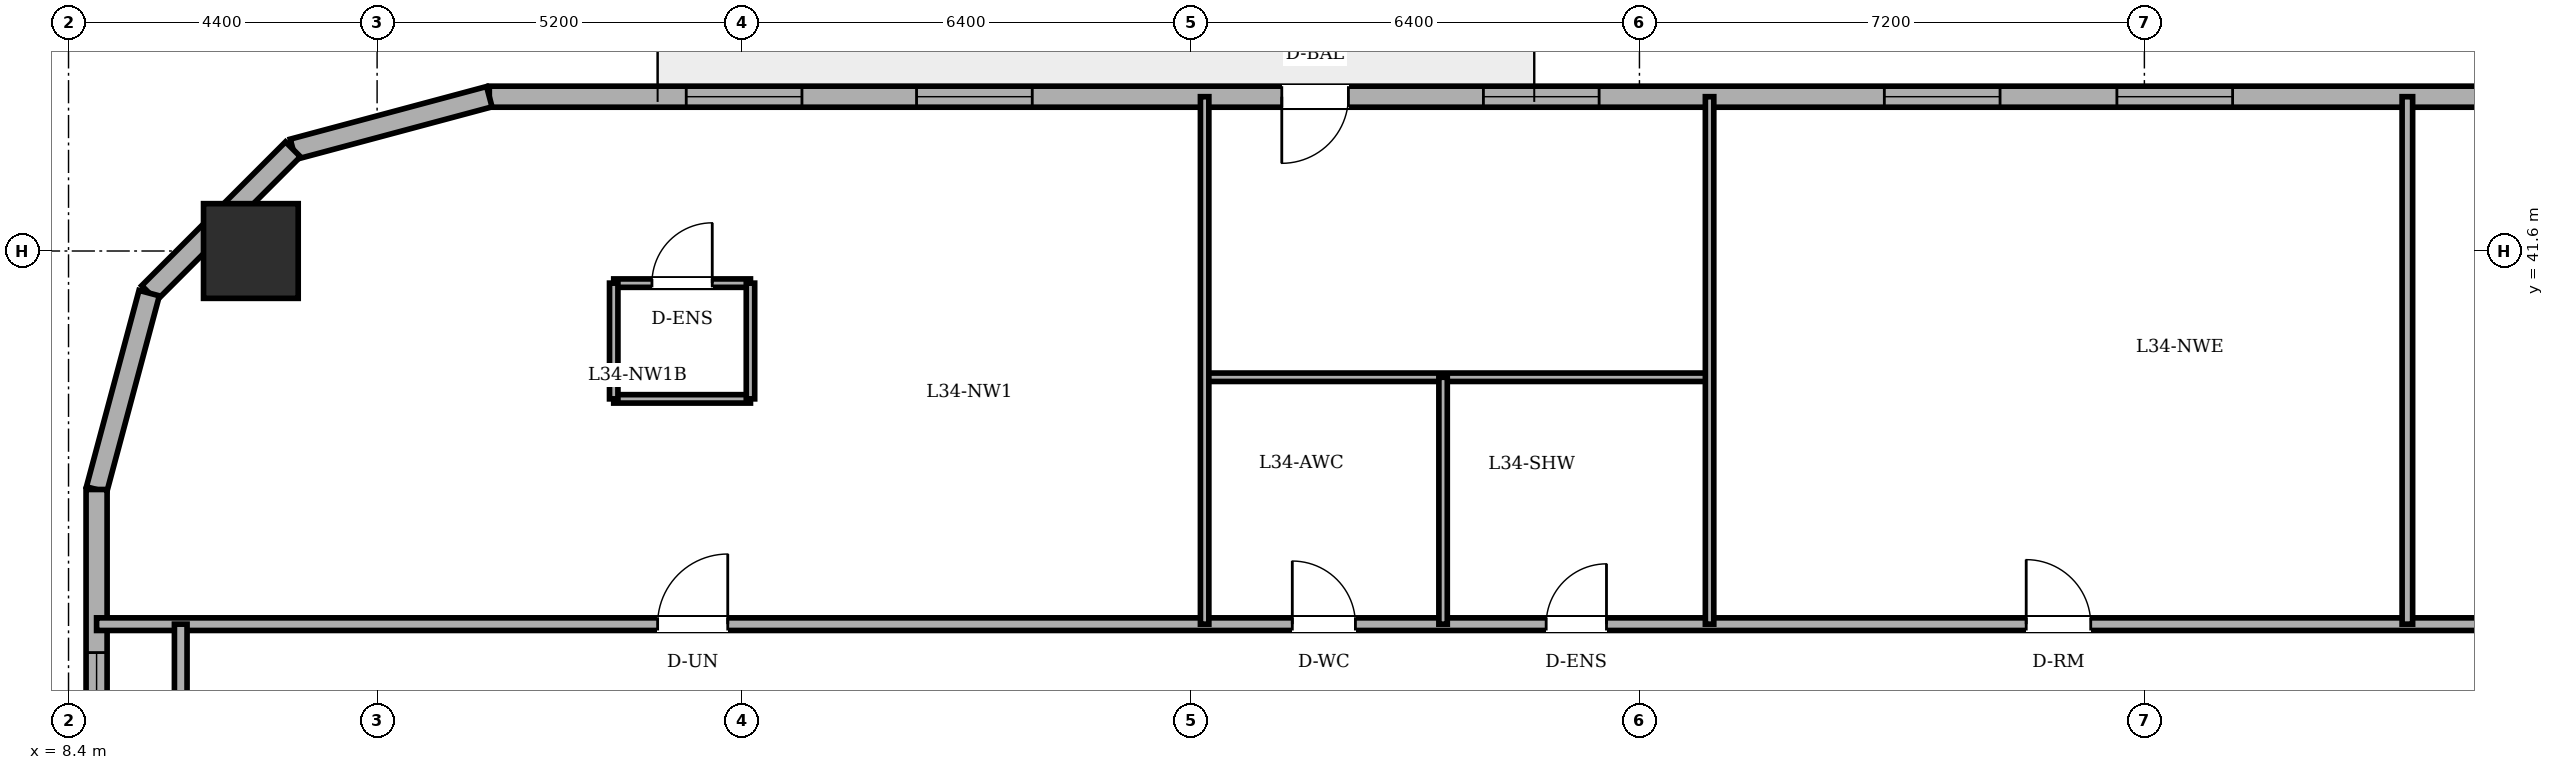
"""IFC4 building model, lengths in metres.
Left out: names, types, materials, properties, quantities, classifications, styles, units other than length and angle.
Written with IfcOpenShell. Run it as: python <this file> out.ifc"""

import sys

from ifc_helpers import new_model, si_unit, direction, frame, frame_2d, origin, origin_2d, place, context, subcontext, project, spatial, rectangle, circle, extrude, element, fill, save


model = new_model("IFC4")
c1 = context("Model", 3, precision=1e-05, world=origin(), true_north=direction((0.0, 1.0)))
c2 = subcontext(c1, "Body", "Model", "MODEL_VIEW")
j1 = project(units=[si_unit("LENGTHUNIT", "METRE"), si_unit("PLANEANGLEUNIT", "RADIAN")], contexts=[c1])
p1 = place(None, origin())
s1 = spatial("IfcSite", under=j1, at=p1, CompositionType="ELEMENT")
p2 = place(p1, origin())
s2 = spatial("IfcBuilding", under=s1, at=p2, CompositionType="ELEMENT")
p3 = place(p2, frame((0.0, 0.0, 129.5)))
s3 = spatial("IfcBuildingStorey", under=s2, at=p3, CompositionType="ELEMENT", Elevation=129.5)
p4 = place(p3, frame((11.0, 41.6, 0.0), z_axis=(0.0, 0.0, 1.0), x_axis=(1.0, 0.0, 0.0)))
e1 = element("IfcColumn", 1, at=p4, inside=s3, PredefinedType="COLUMN", context=c2, shape_type="SweptSolid", body=[
    extrude(circle(Radius=0.675, at=origin_2d()), origin(), (0.0, 0.0, 1.0), 3.6),
])
p5 = place(p3, frame((44.333, 43.8, 0.0), z_axis=(0.0, 0.0, 1.0), x_axis=(-1.0, 0.0, 0.0)))
e2 = element("IfcWall", 2, at=p5, inside=s3, PredefinedType="SOLIDWALL", context=c2, shape_type="SweptSolid", body=[
    extrude(rectangle(XDim=29.933, YDim=0.3, at=frame_2d((14.967, 0.0))), origin(), (0.0, 0.0, 1.0), 3.36),
])
p6 = place(p5, frame((17.683, 0.0, 0.0)))
e3 = element("IfcOpeningElement", 3, at=p6, cuts=e2, PredefinedType="OPENING", context=c2, shape_type="SweptSolid", body=[
    extrude(rectangle(XDim=0.95, YDim=2.2, at=frame_2d((0.475, 1.1))), frame((0.0, 0.16, 0.0), z_axis=(0.0, -1.0, 0.0), x_axis=(1.0, 0.0, 0.0)), (0.0, 0.0, 1.0), 0.32),
])
p7 = place(p5, frame((5.075, 0.0, 0.85)))
e4 = element("IfcOpeningElement", 4, at=p7, cuts=e2, PredefinedType="OPENING", context=c2, shape_type="SweptSolid", body=[
    extrude(rectangle(XDim=1.65, YDim=1.55, at=frame_2d((0.825, 0.775))), frame((0.0, 0.16, 0.0), z_axis=(0.0, -1.0, 0.0), x_axis=(1.0, 0.0, 0.0)), (0.0, 0.0, 1.0), 0.32),
])
p8 = place(p5, frame((8.391, 0.0, 0.85)))
e5 = element("IfcOpeningElement", 5, at=p8, cuts=e2, PredefinedType="OPENING", context=c2, shape_type="SweptSolid", body=[
    extrude(rectangle(XDim=1.65, YDim=1.55, at=frame_2d((0.825, 0.775))), frame((0.0, 0.16, 0.0), z_axis=(0.0, -1.0, 0.0), x_axis=(1.0, 0.0, 0.0)), (0.0, 0.0, 1.0), 0.32),
])
p9 = place(p5, frame((14.108, 0.0, 0.85)))
e6 = element("IfcOpeningElement", 6, at=p9, cuts=e2, PredefinedType="OPENING", context=c2, shape_type="SweptSolid", body=[
    extrude(rectangle(XDim=1.65, YDim=1.55, at=frame_2d((0.825, 0.775))), frame((0.0, 0.16, 0.0), z_axis=(0.0, -1.0, 0.0), x_axis=(1.0, 0.0, 0.0)), (0.0, 0.0, 1.0), 0.32),
])
p10 = place(p5, frame((22.191, 0.0, 0.85)))
e7 = element("IfcOpeningElement", 7, at=p10, cuts=e2, PredefinedType="OPENING", context=c2, shape_type="SweptSolid", body=[
    extrude(rectangle(XDim=1.65, YDim=1.55, at=frame_2d((0.825, 0.775))), frame((0.0, 0.16, 0.0), z_axis=(0.0, -1.0, 0.0), x_axis=(1.0, 0.0, 0.0)), (0.0, 0.0, 1.0), 0.32),
])
p11 = place(p5, frame((25.475, 0.0, 0.85)))
e8 = element("IfcOpeningElement", 8, at=p11, cuts=e2, PredefinedType="OPENING", context=c2, shape_type="SweptSolid", body=[
    extrude(rectangle(XDim=1.65, YDim=1.55, at=frame_2d((0.825, 0.775))), frame((0.0, 0.16, 0.0), z_axis=(0.0, -1.0, 0.0), x_axis=(1.0, 0.0, 0.0)), (0.0, 0.0, 1.0), 0.32),
])
p12 = place(p3, frame((14.4, 43.8, 0.0), z_axis=(0.0, 0.0, 1.0), x_axis=(-0.965943540406, -0.258752926066, 0.0)))
e9 = element("IfcWall", 9, at=p12, inside=s3, PredefinedType="SOLIDWALL", context=c2, shape_type="SweptSolid", body=[
    extrude(rectangle(XDim=2.898, YDim=0.3, at=frame_2d((1.449, 0.0))), origin(), (0.0, 0.0, 1.0), 3.36),
])
p13 = place(p3, frame((11.6, 43.05, 0.0), z_axis=(0.0, 0.0, 1.0), x_axis=(-0.707106781187, -0.707106781187, 0.0)))
e10 = element("IfcWall", 10, at=p13, inside=s3, PredefinedType="SOLIDWALL", context=c2, shape_type="SweptSolid", body=[
    extrude(rectangle(XDim=2.899, YDim=0.3, at=frame_2d((1.45, 0.0))), origin(), (0.0, 0.0, 1.0), 3.36),
])
p14 = place(p3, frame((9.55, 41.0, 0.0), z_axis=(0.0, 0.0, 1.0), x_axis=(-0.258731875344, -0.96594917914, 0.0)))
e11 = element("IfcWall", 11, at=p14, inside=s3, PredefinedType="SOLIDWALL", context=c2, shape_type="SweptSolid", body=[
    extrude(rectangle(XDim=2.899, YDim=0.3, at=frame_2d((1.449, 0.0))), origin(), (0.0, 0.0, 1.0), 3.36),
])
p15 = place(p3, frame((8.8, 38.2, 0.0), z_axis=(0.0, 0.0, 1.0), x_axis=(0.0, -1.0, 0.0)))
e12 = element("IfcWall", 12, at=p15, inside=s3, PredefinedType="SOLIDWALL", context=c2, shape_type="SweptSolid", body=[
    extrude(rectangle(XDim=28.4, YDim=0.3, at=frame_2d((14.2, 0.0))), origin(), (0.0, 0.0, 1.0), 3.36),
])
p16 = place(p15, frame((2.325, 0.0, 0.85)))
e13 = element("IfcOpeningElement", 13, at=p16, cuts=e12, PredefinedType="OPENING", context=c2, shape_type="SweptSolid", body=[
    extrude(rectangle(XDim=1.65, YDim=1.55, at=frame_2d((0.825, 0.775))), frame((0.0, 0.16, 0.0), z_axis=(0.0, -1.0, 0.0), x_axis=(1.0, 0.0, 0.0)), (0.0, 0.0, 1.0), 0.32),
])
p17 = place(p15, frame((6.828, 0.0, 0.85)))
e14 = element("IfcOpeningElement", 14, at=p17, cuts=e12, PredefinedType="OPENING", context=c2, shape_type="SweptSolid", body=[
    extrude(rectangle(XDim=1.65, YDim=1.55, at=frame_2d((0.825, 0.775))), frame((0.0, 0.16, 0.0), z_axis=(0.0, -1.0, 0.0), x_axis=(1.0, 0.0, 0.0)), (0.0, 0.0, 1.0), 0.32),
])
p18 = place(p15, frame((10.102, 0.0, 0.85)))
e15 = element("IfcOpeningElement", 15, at=p18, cuts=e12, PredefinedType="OPENING", context=c2, shape_type="SweptSolid", body=[
    extrude(rectangle(XDim=1.65, YDim=1.55, at=frame_2d((0.825, 0.775))), frame((0.0, 0.16, 0.0), z_axis=(0.0, -1.0, 0.0), x_axis=(1.0, 0.0, 0.0)), (0.0, 0.0, 1.0), 0.32),
])
p19 = place(p15, frame((16.648, 0.0, 0.85)))
e16 = element("IfcOpeningElement", 16, at=p19, cuts=e12, PredefinedType="OPENING", context=c2, shape_type="SweptSolid", body=[
    extrude(rectangle(XDim=1.65, YDim=1.55, at=frame_2d((0.825, 0.775))), frame((0.0, 0.16, 0.0), z_axis=(0.0, -1.0, 0.0), x_axis=(1.0, 0.0, 0.0)), (0.0, 0.0, 1.0), 0.32),
])
p20 = place(p15, frame((19.922, 0.0, 0.85)))
e17 = element("IfcOpeningElement", 17, at=p20, cuts=e12, PredefinedType="OPENING", context=c2, shape_type="SweptSolid", body=[
    extrude(rectangle(XDim=1.65, YDim=1.55, at=frame_2d((0.825, 0.775))), frame((0.0, 0.16, 0.0), z_axis=(0.0, -1.0, 0.0), x_axis=(1.0, 0.0, 0.0)), (0.0, 0.0, 1.0), 0.32),
])
p21 = place(p15, frame((24.425, 0.0, 0.85)))
e18 = element("IfcOpeningElement", 18, at=p21, cuts=e12, PredefinedType="OPENING", context=c2, shape_type="SweptSolid", body=[
    extrude(rectangle(XDim=1.65, YDim=1.55, at=frame_2d((0.825, 0.775))), frame((0.0, 0.16, 0.0), z_axis=(0.0, -1.0, 0.0), x_axis=(1.0, 0.0, 0.0)), (0.0, 0.0, 1.0), 0.32),
])
p22 = place(p3, frame((16.174, 41.142, 0.0), z_axis=(0.0, 0.0, 1.0), x_axis=(1.0, 0.0, 0.0)))
e19 = element("IfcWall", 19, at=p22, inside=s3, PredefinedType="PARTITIONING", context=c2, shape_type="SweptSolid", body=[
    extrude(rectangle(XDim=1.95, YDim=0.12, at=frame_2d((0.975, 0.0))), origin(), (0.0, 0.0, 1.0), 3.36),
])
p23 = place(p22, frame((0.545, 0.0, 0.0)))
e20 = element("IfcOpeningElement", 20, at=p23, cuts=e19, PredefinedType="OPENING", context=c2, shape_type="SweptSolid", body=[
    extrude(rectangle(XDim=0.86, YDim=2.1, at=frame_2d((0.43, 1.05))), frame((0.0, 0.07, 0.0), z_axis=(0.0, -1.0, 0.0), x_axis=(1.0, 0.0, 0.0)), (0.0, 0.0, 1.0), 0.14),
])
p24 = place(p3, frame((18.124, 39.492, 0.0), z_axis=(0.0, 0.0, 1.0), x_axis=(-1.0, 0.0, 0.0)))
e21 = element("IfcWall", 21, at=p24, inside=s3, PredefinedType="PARTITIONING", context=c2, shape_type="SweptSolid", body=[
    extrude(rectangle(XDim=1.95, YDim=0.12, at=frame_2d((0.975, 0.0))), origin(), (0.0, 0.0, 1.0), 3.36),
])
for number, where, z_axis, x_axis in (
    (22, (16.174, 41.142, 0.0), (0.0, 0.0, 1.0), (0.0, -1.0, 0.0)),
    (23, (18.124, 39.492, 0.0), (0.0, 0.0, 1.0), (0.0, 1.0, 0.0)),
):
    element("IfcWall", number, at=place(p3, frame(where, z_axis=z_axis, x_axis=x_axis)), inside=s3, PredefinedType="PARTITIONING", context=c2, shape_type="SweptSolid", body=[
        extrude(rectangle(XDim=1.65, YDim=0.12, at=frame_2d((0.825, 0.0))), origin(), (0.0, 0.0, 1.0), 3.36),
    ])
p25 = place(p3, frame((8.8, 36.28, 0.0), z_axis=(0.0, 0.0, 1.0), x_axis=(1.0, 0.0, 0.0)))
e24 = element("IfcWall", 24, at=p25, inside=s3, PredefinedType="PARTITIONING", context=c2, shape_type="SweptSolid", body=[
    extrude(rectangle(XDim=47.141, YDim=0.18, at=frame_2d((23.57, 0.0))), origin(), (0.0, 0.0, 1.0), 3.36),
])
p26 = place(p25, frame((17.05, 0.0, 0.0)))
e25 = element("IfcOpeningElement", 25, at=p26, cuts=e24, PredefinedType="OPENING", context=c2, shape_type="SweptSolid", body=[
    extrude(rectangle(XDim=0.9, YDim=2.1, at=frame_2d((0.45, 1.05))), frame((0.0, 0.1, 0.0), z_axis=(0.0, -1.0, 0.0), x_axis=(1.0, 0.0, 0.0)), (0.0, 0.0, 1.0), 0.2),
])
p27 = place(p25, frame((20.67, 0.0, 0.0)))
e26 = element("IfcOpeningElement", 26, at=p27, cuts=e24, PredefinedType="OPENING", context=c2, shape_type="SweptSolid", body=[
    extrude(rectangle(XDim=0.86, YDim=2.1, at=frame_2d((0.43, 1.05))), frame((0.0, 0.1, 0.0), z_axis=(0.0, -1.0, 0.0), x_axis=(1.0, 0.0, 0.0)), (0.0, 0.0, 1.0), 0.2),
])
p28 = place(p25, frame((34.95, 0.0, 0.0)))
e27 = element("IfcOpeningElement", 27, at=p28, cuts=e24, PredefinedType="OPENING", context=c2, shape_type="SweptSolid", body=[
    extrude(rectangle(XDim=1.0, YDim=2.15, at=frame_2d((0.5, 1.075))), frame((0.0, 0.1, 0.0), z_axis=(0.0, -1.0, 0.0), x_axis=(1.0, 0.0, 0.0)), (0.0, 0.0, 1.0), 0.2),
])
p29 = place(p25, frame((8.0, 0.0, 0.0)))
e28 = element("IfcOpeningElement", 28, at=p29, cuts=e24, PredefinedType="OPENING", context=c2, shape_type="SweptSolid", body=[
    extrude(rectangle(XDim=1.0, YDim=2.15, at=frame_2d((0.5, 1.075))), frame((0.0, 0.1, 0.0), z_axis=(0.0, -1.0, 0.0), x_axis=(1.0, 0.0, 0.0)), (0.0, 0.0, 1.0), 0.2),
])
p30 = place(p25, frame((27.515, 0.0, 0.0)))
e29 = element("IfcOpeningElement", 29, at=p30, cuts=e24, PredefinedType="OPENING", context=c2, shape_type="SweptSolid", body=[
    extrude(rectangle(XDim=0.92, YDim=2.1, at=frame_2d((0.46, 1.05))), frame((0.0, 0.1, 0.0), z_axis=(0.0, -1.0, 0.0), x_axis=(1.0, 0.0, 0.0)), (0.0, 0.0, 1.0), 0.2),
])
p31 = place(p3, frame((24.6, 39.8, 0.0), z_axis=(0.0, 0.0, 1.0), x_axis=(1.0, 0.0, 0.0)))
e30 = element("IfcWall", 30, at=p31, inside=s3, PredefinedType="PARTITIONING", context=c2, shape_type="SweptSolid", body=[
    extrude(rectangle(XDim=7.2, YDim=0.12, at=frame_2d((3.6, 0.0))), origin(), (0.0, 0.0, 1.0), 3.36),
])
p32 = place(p3, frame((10.0, 33.82, 0.0), z_axis=(0.0, 0.0, 1.0), x_axis=(0.0, 1.0, 0.0)))
e31 = element("IfcWall", 31, at=p32, inside=s3, PredefinedType="PARTITIONING", context=c2, shape_type="SweptSolid", body=[
    extrude(rectangle(XDim=2.46, YDim=0.18, at=frame_2d((1.23, 0.0))), origin(), (0.0, 0.0, 1.0), 3.36),
])
p33 = place(p3, frame((24.6, 36.28, 0.0), z_axis=(0.0, 0.0, 1.0), x_axis=(0.0, 1.0, 0.0)))
e32 = element("IfcWall", 32, at=p33, inside=s3, PredefinedType="PARTITIONING", context=c2, shape_type="SweptSolid", body=[
    extrude(rectangle(XDim=7.52, YDim=0.12, at=frame_2d((3.76, 0.0))), origin(), (0.0, 0.0, 1.0), 3.36),
])
p34 = place(p3, frame((28.0, 36.28, 0.0), z_axis=(0.0, 0.0, 1.0), x_axis=(0.0, 1.0, 0.0)))
e33 = element("IfcWall", 33, at=p34, inside=s3, PredefinedType="PARTITIONING", context=c2, shape_type="SweptSolid", body=[
    extrude(rectangle(XDim=3.52, YDim=0.12, at=frame_2d((1.76, 0.0))), origin(), (0.0, 0.0, 1.0), 3.36),
])
p35 = place(p3, frame((31.8, 36.28, 0.0), z_axis=(0.0, 0.0, 1.0), x_axis=(0.0, 1.0, 0.0)))
e34 = element("IfcWall", 34, at=p35, inside=s3, PredefinedType="PARTITIONING", context=c2, shape_type="SweptSolid", body=[
    extrude(rectangle(XDim=7.52, YDim=0.12, at=frame_2d((3.76, 0.0))), origin(), (0.0, 0.0, 1.0), 3.36),
])
p36 = place(p3, frame((41.75, 36.28, 0.0), z_axis=(0.0, 0.0, 1.0), x_axis=(0.0, 1.0, 0.0)))
e35 = element("IfcWall", 35, at=p36, inside=s3, PredefinedType="PARTITIONING", context=c2, shape_type="SweptSolid", body=[
    extrude(rectangle(XDim=7.52, YDim=0.15, at=frame_2d((3.76, 0.0))), origin(), (0.0, 0.0, 1.0), 3.36),
])
p37 = place(p6, origin())
e36 = element("IfcDoor", 36, at=p37, inside=s3, OperationType="SINGLE_SWING_RIGHT", PredefinedType="DOOR", context=c2, shape_type="SweptSolid", body=[
    extrude(rectangle(XDim=0.95, YDim=2.2, at=frame_2d((0.475, 1.1))), frame((0.0, 0.025, 0.0), z_axis=(0.0, -1.0, 0.0), x_axis=(1.0, 0.0, 0.0)), (0.0, 0.0, 1.0), 0.05),
])
fill(e3, e36)
p38 = place(p7, origin())
e37 = element("IfcWindow", 37, at=p38, inside=s3, PartitioningType="DOUBLE_PANEL_VERTICAL", PredefinedType="WINDOW", context=c2, shape_type="SweptSolid", body=[
    extrude(rectangle(XDim=1.65, YDim=1.55, at=frame_2d((0.825, 0.775))), frame((0.0, 0.03, 0.0), z_axis=(0.0, -1.0, 0.0), x_axis=(1.0, 0.0, 0.0)), (0.0, 0.0, 1.0), 0.06),
])
fill(e4, e37)
p39 = place(p8, origin())
e38 = element("IfcWindow", 38, at=p39, inside=s3, PartitioningType="DOUBLE_PANEL_VERTICAL", PredefinedType="WINDOW", context=c2, shape_type="SweptSolid", body=[
    extrude(rectangle(XDim=1.65, YDim=1.55, at=frame_2d((0.825, 0.775))), frame((0.0, 0.03, 0.0), z_axis=(0.0, -1.0, 0.0), x_axis=(1.0, 0.0, 0.0)), (0.0, 0.0, 1.0), 0.06),
])
fill(e5, e38)
p40 = place(p9, origin())
e39 = element("IfcWindow", 39, at=p40, inside=s3, PartitioningType="DOUBLE_PANEL_VERTICAL", PredefinedType="WINDOW", context=c2, shape_type="SweptSolid", body=[
    extrude(rectangle(XDim=1.65, YDim=1.55, at=frame_2d((0.825, 0.775))), frame((0.0, 0.03, 0.0), z_axis=(0.0, -1.0, 0.0), x_axis=(1.0, 0.0, 0.0)), (0.0, 0.0, 1.0), 0.06),
])
fill(e6, e39)
p41 = place(p10, origin())
e40 = element("IfcWindow", 40, at=p41, inside=s3, PartitioningType="DOUBLE_PANEL_VERTICAL", PredefinedType="WINDOW", context=c2, shape_type="SweptSolid", body=[
    extrude(rectangle(XDim=1.65, YDim=1.55, at=frame_2d((0.825, 0.775))), frame((0.0, 0.03, 0.0), z_axis=(0.0, -1.0, 0.0), x_axis=(1.0, 0.0, 0.0)), (0.0, 0.0, 1.0), 0.06),
])
fill(e7, e40)
p42 = place(p11, origin())
e41 = element("IfcWindow", 41, at=p42, inside=s3, PartitioningType="DOUBLE_PANEL_VERTICAL", PredefinedType="WINDOW", context=c2, shape_type="SweptSolid", body=[
    extrude(rectangle(XDim=1.65, YDim=1.55, at=frame_2d((0.825, 0.775))), frame((0.0, 0.03, 0.0), z_axis=(0.0, -1.0, 0.0), x_axis=(1.0, 0.0, 0.0)), (0.0, 0.0, 1.0), 0.06),
])
fill(e8, e41)
p43 = place(p16, origin())
e42 = element("IfcWindow", 42, at=p43, inside=s3, PartitioningType="DOUBLE_PANEL_VERTICAL", PredefinedType="WINDOW", context=c2, shape_type="SweptSolid", body=[
    extrude(rectangle(XDim=1.65, YDim=1.55, at=frame_2d((0.825, 0.775))), frame((0.0, 0.03, 0.0), z_axis=(0.0, -1.0, 0.0), x_axis=(1.0, 0.0, 0.0)), (0.0, 0.0, 1.0), 0.06),
])
fill(e13, e42)
p44 = place(p23, origin())
e43 = element("IfcDoor", 43, at=p44, inside=s3, OperationType="SINGLE_SWING_RIGHT", PredefinedType="DOOR", context=c2, shape_type="SweptSolid", body=[
    extrude(rectangle(XDim=0.86, YDim=2.1, at=frame_2d((0.43, 1.05))), frame((0.0, 0.025, 0.0), z_axis=(0.0, -1.0, 0.0), x_axis=(1.0, 0.0, 0.0)), (0.0, 0.0, 1.0), 0.05),
])
fill(e20, e43)
p45 = place(p26, origin())
e44 = element("IfcDoor", 44, at=p45, inside=s3, OperationType="SINGLE_SWING_LEFT", PredefinedType="DOOR", context=c2, shape_type="SweptSolid", body=[
    extrude(rectangle(XDim=0.9, YDim=2.1, at=frame_2d((0.45, 1.05))), frame((0.0, 0.025, 0.0), z_axis=(0.0, -1.0, 0.0), x_axis=(1.0, 0.0, 0.0)), (0.0, 0.0, 1.0), 0.05),
])
fill(e25, e44)
p46 = place(p27, origin())
e45 = element("IfcDoor", 45, at=p46, inside=s3, OperationType="SINGLE_SWING_RIGHT", PredefinedType="DOOR", context=c2, shape_type="SweptSolid", body=[
    extrude(rectangle(XDim=0.86, YDim=2.1, at=frame_2d((0.43, 1.05))), frame((0.0, 0.025, 0.0), z_axis=(0.0, -1.0, 0.0), x_axis=(1.0, 0.0, 0.0)), (0.0, 0.0, 1.0), 0.05),
])
fill(e26, e45)
p47 = place(p29, origin())
e46 = element("IfcDoor", 46, at=p47, inside=s3, OperationType="SINGLE_SWING_RIGHT", PredefinedType="DOOR", context=c2, shape_type="SweptSolid", body=[
    extrude(rectangle(XDim=1.0, YDim=2.15, at=frame_2d((0.5, 1.075))), frame((0.0, 0.025, 0.0), z_axis=(0.0, -1.0, 0.0), x_axis=(1.0, 0.0, 0.0)), (0.0, 0.0, 1.0), 0.05),
])
fill(e28, e46)
p48 = place(p30, origin())
e47 = element("IfcDoor", 47, at=p48, inside=s3, OperationType="SINGLE_SWING_LEFT", PredefinedType="DOOR", context=c2, shape_type="SweptSolid", body=[
    extrude(rectangle(XDim=0.92, YDim=2.1, at=frame_2d((0.46, 1.05))), frame((0.0, 0.025, 0.0), z_axis=(0.0, -1.0, 0.0), x_axis=(1.0, 0.0, 0.0)), (0.0, 0.0, 1.0), 0.05),
])
fill(e29, e47)
save(model, sys.argv[1])
